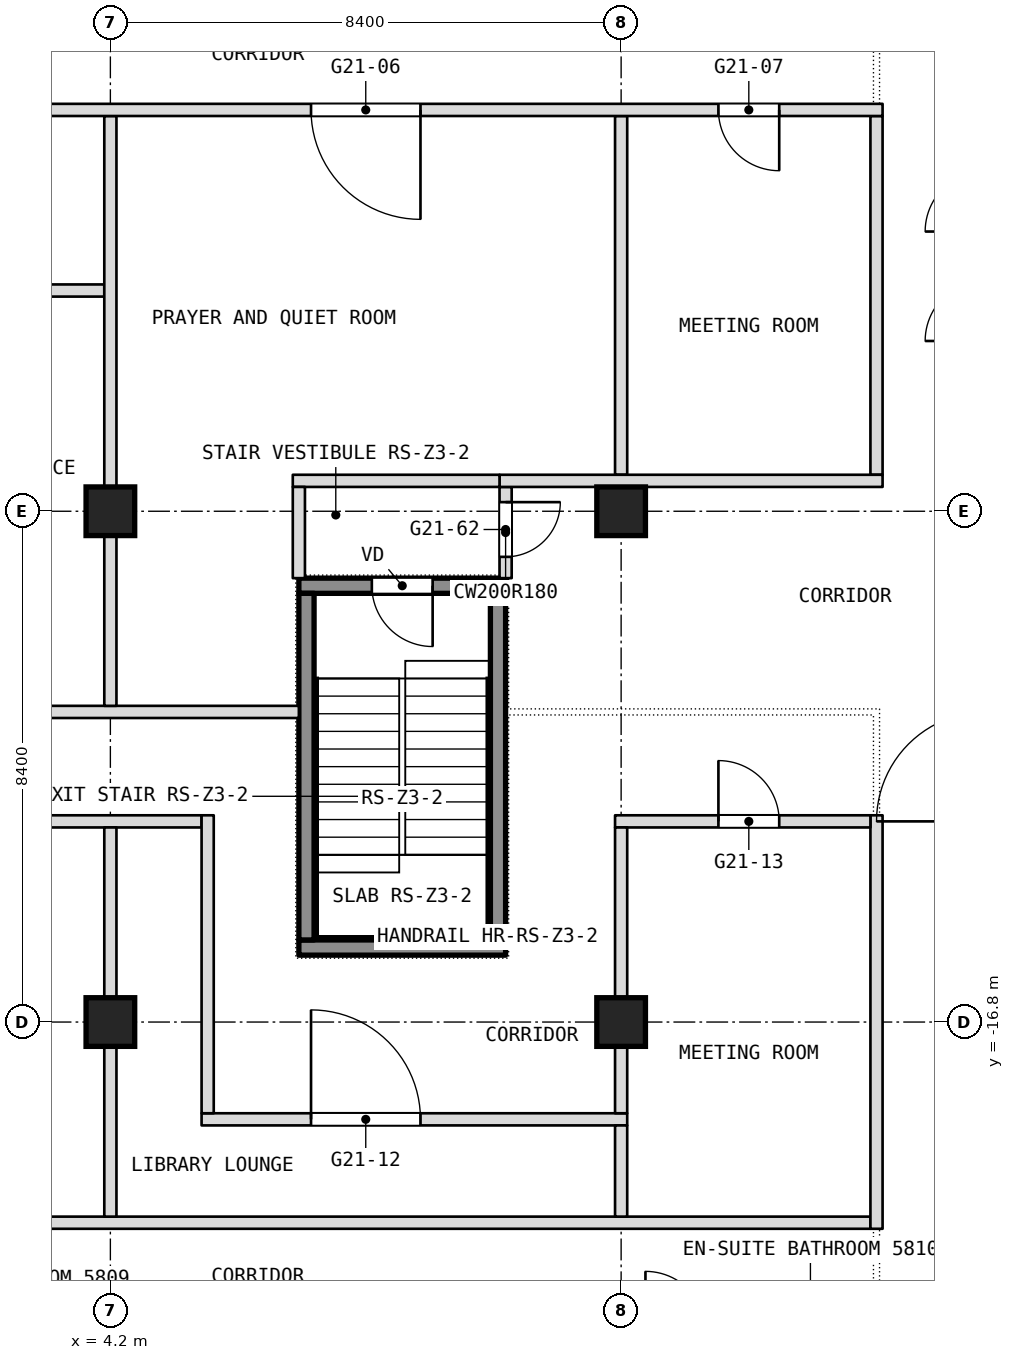
"""IFC4 building model, lengths in metres.
Left out: names, types, materials, properties, quantities, classifications, styles, units other than length and angle.
Written with IfcOpenShell. Run it as: python <this file> out.ifc"""

import sys

from ifc_helpers import new_model, si_unit, direction, frame, frame_2d, origin, origin_2d, place, context, subcontext, project, spatial, rectangle, extrude, element, fill, save


model = new_model("IFC4")
c1 = context("Model", 3, precision=1e-05, world=origin(), true_north=direction((0.0, 1.0)))
c2 = subcontext(c1, "Body", "Model", "MODEL_VIEW")
j1 = project(units=[si_unit("LENGTHUNIT", "METRE"), si_unit("PLANEANGLEUNIT", "RADIAN")], contexts=[c1])
p1 = place(None, origin())
s1 = spatial("IfcSite", under=j1, at=p1, CompositionType="ELEMENT")
p2 = place(p1, origin())
s2 = spatial("IfcBuilding", under=s1, at=p2, CompositionType="ELEMENT")
p3 = place(p2, frame((0.0, 0.0, 245.3)))
s3 = spatial("IfcBuildingStorey", under=s2, at=p3, CompositionType="ELEMENT", Elevation=245.3)
for number, where, z_axis, x_axis in (
    (1, (4.2, -16.8, 0.0), (0.0, 0.0, 1.0), (1.0, 0.0, 0.0)),
    (2, (4.2, -8.4, 0.0), (0.0, 0.0, 1.0), (1.0, 0.0, 0.0)),
    (3, (12.6, -16.8, 0.0), (0.0, 0.0, 1.0), (1.0, 0.0, 0.0)),
    (4, (12.6, -8.4, 0.0), (0.0, 0.0, 1.0), (1.0, 0.0, 0.0)),
):
    element("IfcColumn", number, at=place(p3, frame(where, z_axis=z_axis, x_axis=x_axis)), inside=s3, PredefinedType="COLUMN", context=c2, shape_type="SweptSolid", body=[
        extrude(rectangle(XDim=0.8, YDim=0.8, at=origin_2d()), origin(), (0.0, 0.0, 1.0), 3.6),
    ])
p4 = place(p3, frame((-16.7, -20.1, 0.0), z_axis=(0.0, 0.0, 1.0), x_axis=(1.0, 0.0, 0.0)))
e5 = element("IfcWall", 5, at=p4, inside=s3, PredefinedType="PARTITIONING", context=c2, shape_type="SweptSolid", body=[
    extrude(rectangle(XDim=33.4, YDim=0.2, at=frame_2d((16.7, 0.0))), origin(), (0.0, 0.0, 1.0), 3.34),
])
p5 = place(p3, frame((5.7, -18.4, 0.0), z_axis=(0.0, 0.0, 1.0), x_axis=(1.0, 0.0, 0.0)))
e6 = element("IfcWall", 6, at=p5, inside=s3, PredefinedType="PARTITIONING", context=c2, shape_type="SweptSolid", body=[
    extrude(rectangle(XDim=7.0, YDim=0.2, at=frame_2d((3.5, 0.0))), origin(), (0.0, 0.0, 1.0), 3.34),
])
p6 = place(p5, frame((1.8, 0.0, 0.0)))
e7 = element("IfcOpeningElement", 7, at=p6, cuts=e6, PredefinedType="OPENING", context=c2, shape_type="SweptSolid", body=[
    extrude(rectangle(XDim=1.8, YDim=2.1, at=frame_2d((0.9, 1.05))), frame((0.0, 0.1, 0.0), z_axis=(0.0, -1.0, 0.0), x_axis=(1.0, 0.0, 0.0)), (0.0, 0.0, 1.0), 0.2),
])
p7 = place(p3, frame((16.8, -20.2, 0.0), z_axis=(0.0, 0.0, 1.0), x_axis=(0.0, 1.0, 0.0)))
e8 = element("IfcWall", 8, at=p7, inside=s3, PredefinedType="PARTITIONING", context=c2, shape_type="SweptSolid", body=[
    extrude(rectangle(XDim=6.8, YDim=0.2, at=frame_2d((3.4, 0.0))), origin(), (0.0, 0.0, 1.0), 3.34),
])
p8 = place(p3, frame((16.8, -7.8, 0.0), z_axis=(0.0, 0.0, 1.0), x_axis=(0.0, 1.0, 0.0)))
e9 = element("IfcWall", 9, at=p8, inside=s3, PredefinedType="PARTITIONING", context=c2, shape_type="SweptSolid", body=[
    extrude(rectangle(XDim=5.9, YDim=0.2, at=frame_2d((2.95, 0.0))), origin(), (0.0, 0.0, 1.0), 3.34),
])
p9 = place(p3, frame((-5.9, -13.5, 0.0), z_axis=(0.0, 0.0, 1.0), x_axis=(1.0, 0.0, 0.0)))
e10 = element("IfcWall", 10, at=p9, inside=s3, PredefinedType="PARTITIONING", context=c2, shape_type="SweptSolid", body=[
    extrude(rectangle(XDim=11.6, YDim=0.2, at=frame_2d((5.8, 0.0))), origin(), (0.0, 0.0, 1.0), 3.34),
])
p10 = place(p9, frame((5.0, 0.0, 0.0)))
e11 = element("IfcOpeningElement", 11, at=p10, cuts=e10, PredefinedType="OPENING", context=c2, shape_type="SweptSolid", body=[
    extrude(rectangle(XDim=1.8, YDim=2.1, at=frame_2d((0.9, 1.05))), frame((0.0, 0.1, 0.0), z_axis=(0.0, -1.0, 0.0), x_axis=(1.0, 0.0, 0.0)), (0.0, 0.0, 1.0), 0.2),
])
p11 = place(p3, frame((12.5, -13.5, 0.0), z_axis=(0.0, 0.0, 1.0), x_axis=(1.0, 0.0, 0.0)))
e12 = element("IfcWall", 12, at=p11, inside=s3, PredefinedType="PARTITIONING", context=c2, shape_type="SweptSolid", body=[
    extrude(rectangle(XDim=4.2, YDim=0.2, at=frame_2d((2.1, 0.0))), origin(), (0.0, 0.0, 1.0), 3.34),
])
p12 = place(p11, frame((1.7, 0.0, 0.0)))
e13 = element("IfcOpeningElement", 13, at=p12, cuts=e12, PredefinedType="OPENING", context=c2, shape_type="SweptSolid", body=[
    extrude(rectangle(XDim=1.0, YDim=2.1, at=frame_2d((0.5, 1.05))), frame((0.0, 0.1, 0.0), z_axis=(0.0, -1.0, 0.0), x_axis=(1.0, 0.0, 0.0)), (0.0, 0.0, 1.0), 0.2),
])
p13 = place(p3, frame((12.6, -20.0, 0.0), z_axis=(0.0, 0.0, 1.0), x_axis=(0.0, 1.0, 0.0)))
e14 = element("IfcWall", 14, at=p13, inside=s3, PredefinedType="PARTITIONING", context=c2, shape_type="SweptSolid", body=[
    extrude(rectangle(XDim=1.5, YDim=0.2, at=frame_2d((0.75, 0.0))), origin(), (0.0, 0.0, 1.0), 3.34),
])
p14 = place(p3, frame((12.6, -7.8, 0.0), z_axis=(0.0, 0.0, 1.0), x_axis=(0.0, 1.0, 0.0)))
e15 = element("IfcWall", 15, at=p14, inside=s3, PredefinedType="PARTITIONING", context=c2, shape_type="SweptSolid", body=[
    extrude(rectangle(XDim=5.9, YDim=0.2, at=frame_2d((2.95, 0.0))), origin(), (0.0, 0.0, 1.0), 3.34),
])
p15 = place(p3, frame((12.6, -18.3, 0.0), z_axis=(0.0, 0.0, 1.0), x_axis=(0.0, 1.0, 0.0)))
e16 = element("IfcWall", 16, at=p15, inside=s3, PredefinedType="PARTITIONING", context=c2, shape_type="SweptSolid", body=[
    extrude(rectangle(XDim=4.7, YDim=0.2, at=frame_2d((2.35, 0.0))), origin(), (0.0, 0.0, 1.0), 3.34),
])
p16 = place(p3, frame((-7.3, -11.7, 0.0), z_axis=(0.0, 0.0, 1.0), x_axis=(1.0, 0.0, 0.0)))
e17 = element("IfcWall", 17, at=p16, inside=s3, PredefinedType="PARTITIONING", context=c2, shape_type="SweptSolid", body=[
    extrude(rectangle(XDim=14.6, YDim=0.2, at=frame_2d((7.3, 0.0))), origin(), (0.0, 0.0, 1.0), 3.34),
])
p17 = place(p16, frame((4.7, 0.0, 0.0)))
e18 = element("IfcOpeningElement", 18, at=p17, cuts=e17, PredefinedType="OPENING", context=c2, shape_type="SweptSolid", body=[
    extrude(rectangle(XDim=1.0, YDim=2.1, at=frame_2d((0.5, 1.05))), frame((0.0, 0.1, 0.0), z_axis=(0.0, -1.0, 0.0), x_axis=(1.0, 0.0, 0.0)), (0.0, 0.0, 1.0), 0.2),
])
p18 = place(p16, frame((8.9, 0.0, 0.0)))
e19 = element("IfcOpeningElement", 19, at=p18, cuts=e17, PredefinedType="OPENING", context=c2, shape_type="SweptSolid", body=[
    extrude(rectangle(XDim=1.0, YDim=2.1, at=frame_2d((0.5, 1.05))), frame((0.0, 0.1, 0.0), z_axis=(0.0, -1.0, 0.0), x_axis=(1.0, 0.0, 0.0)), (0.0, 0.0, 1.0), 0.2),
])
p19 = place(p3, frame((10.7, -9.5, 0.0), z_axis=(0.0, 0.0, 1.0), x_axis=(0.0, 1.0, 0.0)))
e20 = element("IfcWall", 20, at=p19, inside=s3, PredefinedType="PARTITIONING", context=c2, shape_type="SweptSolid", body=[
    extrude(rectangle(XDim=1.5, YDim=0.2, at=frame_2d((0.75, 0.0))), origin(), (0.0, 0.0, 1.0), 3.34),
])
p20 = place(p19, frame((0.35, 0.0, 0.0)))
e21 = element("IfcOpeningElement", 21, at=p20, cuts=e20, PredefinedType="OPENING", context=c2, shape_type="SweptSolid", body=[
    extrude(rectangle(XDim=0.9, YDim=2.1, at=frame_2d((0.45, 1.05))), frame((0.0, 0.1, 0.0), z_axis=(0.0, -1.0, 0.0), x_axis=(1.0, 0.0, 0.0)), (0.0, 0.0, 1.0), 0.2),
])
p21 = place(p3, frame((10.6, -7.9, 0.0), z_axis=(0.0, 0.0, 1.0), x_axis=(1.0, 0.0, 0.0)))
e22 = element("IfcWall", 22, at=p21, inside=s3, PredefinedType="PARTITIONING", context=c2, shape_type="SweptSolid", body=[
    extrude(rectangle(XDim=6.3, YDim=0.2, at=frame_2d((3.15, 0.0))), origin(), (0.0, 0.0, 1.0), 3.34),
])
p22 = place(p3, frame((7.2, -7.9, 0.0), z_axis=(0.0, 0.0, 1.0), x_axis=(1.0, 0.0, 0.0)))
e23 = element("IfcWall", 23, at=p22, inside=s3, PredefinedType="PARTITIONING", context=c2, shape_type="SweptSolid", body=[
    extrude(rectangle(XDim=3.4, YDim=0.2, at=frame_2d((1.7, 0.0))), origin(), (0.0, 0.0, 1.0), 3.34),
])
p23 = place(p3, frame((7.3, -9.5, 0.0), z_axis=(0.0, 0.0, 1.0), x_axis=(0.0, 1.0, 0.0)))
e24 = element("IfcWall", 24, at=p23, inside=s3, PredefinedType="PARTITIONING", context=c2, shape_type="SweptSolid", body=[
    extrude(rectangle(XDim=1.5, YDim=0.2, at=frame_2d((0.75, 0.0))), origin(), (0.0, 0.0, 1.0), 3.34),
])
p24 = place(p3, frame((5.8, -18.3, 0.0), z_axis=(0.0, 0.0, 1.0), x_axis=(0.0, 1.0, 0.0)))
e25 = element("IfcWall", 25, at=p24, inside=s3, PredefinedType="PARTITIONING", context=c2, shape_type="SweptSolid", body=[
    extrude(rectangle(XDim=4.9, YDim=0.2, at=frame_2d((2.45, 0.0))), origin(), (0.0, 0.0, 1.0), 3.34),
])
p25 = place(p3, frame((0.1, -4.77, 0.0), z_axis=(0.0, 0.0, 1.0), x_axis=(1.0, 0.0, 0.0)))
e26 = element("IfcWall", 26, at=p25, inside=s3, PredefinedType="PARTITIONING", context=c2, shape_type="SweptSolid", body=[
    extrude(rectangle(XDim=4.0, YDim=0.2, at=frame_2d((2.0, 0.0))), origin(), (0.0, 0.0, 1.0), 3.34),
])
p26 = place(p3, frame((4.2, -20.0, 0.0), z_axis=(0.0, 0.0, 1.0), x_axis=(0.0, 1.0, 0.0)))
e27 = element("IfcWall", 27, at=p26, inside=s3, PredefinedType="PARTITIONING", context=c2, shape_type="SweptSolid", body=[
    extrude(rectangle(XDim=6.4, YDim=0.2, at=frame_2d((3.2, 0.0))), origin(), (0.0, 0.0, 1.0), 3.34),
])
p27 = place(p3, frame((4.2, -11.6, 0.0), z_axis=(0.0, 0.0, 1.0), x_axis=(0.0, 1.0, 0.0)))
e28 = element("IfcWall", 28, at=p27, inside=s3, PredefinedType="PARTITIONING", context=c2, shape_type="SweptSolid", body=[
    extrude(rectangle(XDim=9.7, YDim=0.2, at=frame_2d((4.85, 0.0))), origin(), (0.0, 0.0, 1.0), 3.34),
])
p28 = place(p3, frame((-16.9, -1.8, 0.0), z_axis=(0.0, 0.0, 1.0), x_axis=(1.0, 0.0, 0.0)))
e29 = element("IfcWall", 29, at=p28, inside=s3, PredefinedType="PARTITIONING", context=c2, shape_type="SweptSolid", body=[
    extrude(rectangle(XDim=33.8, YDim=0.2, at=frame_2d((16.9, 0.0))), origin(), (0.0, 0.0, 1.0), 3.34),
])
p29 = place(p28, frame((1.7, 0.0, 0.0)))
e30 = element("IfcOpeningElement", 30, at=p29, cuts=e29, PredefinedType="OPENING", context=c2, shape_type="SweptSolid", body=[
    extrude(rectangle(XDim=1.0, YDim=2.1, at=frame_2d((0.5, 1.05))), frame((0.0, 0.1, 0.0), z_axis=(0.0, -1.0, 0.0), x_axis=(1.0, 0.0, 0.0)), (0.0, 0.0, 1.0), 0.2),
])
p30 = place(p28, frame((5.9, 0.0, 0.0)))
e31 = element("IfcOpeningElement", 31, at=p30, cuts=e29, PredefinedType="OPENING", context=c2, shape_type="SweptSolid", body=[
    extrude(rectangle(XDim=1.0, YDim=2.1, at=frame_2d((0.5, 1.05))), frame((0.0, 0.1, 0.0), z_axis=(0.0, -1.0, 0.0), x_axis=(1.0, 0.0, 0.0)), (0.0, 0.0, 1.0), 0.2),
])
p31 = place(p28, frame((10.1, 0.0, 0.0)))
e32 = element("IfcOpeningElement", 32, at=p31, cuts=e29, PredefinedType="OPENING", context=c2, shape_type="SweptSolid", body=[
    extrude(rectangle(XDim=1.0, YDim=2.1, at=frame_2d((0.5, 1.05))), frame((0.0, 0.1, 0.0), z_axis=(0.0, -1.0, 0.0), x_axis=(1.0, 0.0, 0.0)), (0.0, 0.0, 1.0), 0.2),
])
p32 = place(p28, frame((24.4, 0.0, 0.0)))
e33 = element("IfcOpeningElement", 33, at=p32, cuts=e29, PredefinedType="OPENING", context=c2, shape_type="SweptSolid", body=[
    extrude(rectangle(XDim=1.8, YDim=2.1, at=frame_2d((0.9, 1.05))), frame((0.0, 0.1, 0.0), z_axis=(0.0, -1.0, 0.0), x_axis=(1.0, 0.0, 0.0)), (0.0, 0.0, 1.0), 0.2),
])
p33 = place(p28, frame((31.1, 0.0, 0.0)))
e34 = element("IfcOpeningElement", 34, at=p33, cuts=e29, PredefinedType="OPENING", context=c2, shape_type="SweptSolid", body=[
    extrude(rectangle(XDim=1.0, YDim=2.1, at=frame_2d((0.5, 1.05))), frame((0.0, 0.1, 0.0), z_axis=(0.0, -1.0, 0.0), x_axis=(1.0, 0.0, 0.0)), (0.0, 0.0, 1.0), 0.2),
])
p34 = place(p28, frame((14.3, 0.0, 0.0)))
e35 = element("IfcOpeningElement", 35, at=p34, cuts=e29, PredefinedType="OPENING", context=c2, shape_type="SweptSolid", body=[
    extrude(rectangle(XDim=1.0, YDim=2.1, at=frame_2d((0.5, 1.05))), frame((0.0, 0.1, 0.0), z_axis=(0.0, -1.0, 0.0), x_axis=(1.0, 0.0, 0.0)), (0.0, 0.0, 1.0), 0.2),
])
p35 = place(p28, frame((18.5, 0.0, 0.0)))
e36 = element("IfcOpeningElement", 36, at=p35, cuts=e29, PredefinedType="OPENING", context=c2, shape_type="SweptSolid", body=[
    extrude(rectangle(XDim=1.0, YDim=2.1, at=frame_2d((0.5, 1.05))), frame((0.0, 0.1, 0.0), z_axis=(0.0, -1.0, 0.0), x_axis=(1.0, 0.0, 0.0)), (0.0, 0.0, 1.0), 0.2),
])
p36 = place(p3, frame((7.3, -15.575, 0.1), z_axis=(0.0, 0.0, 1.0), x_axis=(1.0, 0.0, 0.0)))
e37 = element("IfcWall", 37, at=p36, inside=s3, PredefinedType="SHEAR", context=c2, shape_type="SweptSolid", body=[
    extrude(rectangle(XDim=3.4, YDim=0.25, at=frame_2d((1.7, 0.0))), origin(), (0.0, 0.0, 1.0), 3.6),
])
p37 = place(p3, frame((7.3, -9.625, 0.1), z_axis=(0.0, 0.0, 1.0), x_axis=(1.0, 0.0, 0.0)))
e38 = element("IfcWall", 38, at=p37, inside=s3, PredefinedType="SHEAR", context=c2, shape_type="SweptSolid", body=[
    extrude(rectangle(XDim=3.4, YDim=0.25, at=frame_2d((1.7, 0.0))), origin(), (0.0, 0.0, 1.0), 3.6),
])
p38 = place(p37, frame((1.2, 0.0, 0.0)))
e39 = element("IfcOpeningElement", 39, at=p38, cuts=e38, PredefinedType="OPENING", context=c2, shape_type="SweptSolid", body=[
    extrude(rectangle(XDim=1.0, YDim=2.1, at=frame_2d((0.5, 1.05))), frame((0.0, 0.125, 0.0), z_axis=(0.0, -1.0, 0.0), x_axis=(1.0, 0.0, 0.0)), (0.0, 0.0, 1.0), 0.25),
])
for number, where, z_axis, x_axis in (
    (40, (7.425, -15.45, 0.1), (0.0, 0.0, 1.0), (0.0, 1.0, 0.0)),
    (41, (10.575, -15.45, 0.1), (0.0, 0.0, 1.0), (0.0, 1.0, 0.0)),
):
    element("IfcWall", number, at=place(p3, frame(where, z_axis=z_axis, x_axis=x_axis)), inside=s3, PredefinedType="SHEAR", context=c2, shape_type="SweptSolid", body=[
        extrude(rectangle(XDim=5.7, YDim=0.25, at=frame_2d((2.85, 0.0))), origin(), (0.0, 0.0, 1.0), 3.6),
    ])
p39 = place(p6, origin())
e42 = element("IfcDoor", 42, at=p39, inside=s3, OperationType="DOUBLE_DOOR_SINGLE_SWING", PredefinedType="DOOR", context=c2, shape_type="SweptSolid", body=[
    extrude(rectangle(XDim=1.8, YDim=2.1, at=frame_2d((0.9, 1.05))), frame((0.0, 0.025, 0.0), z_axis=(0.0, -1.0, 0.0), x_axis=(1.0, 0.0, 0.0)), (0.0, 0.0, 1.0), 0.05),
])
fill(e7, e42)
p40 = place(p12, origin())
e43 = element("IfcDoor", 43, at=p40, inside=s3, OperationType="SINGLE_SWING_LEFT", PredefinedType="DOOR", context=c2, shape_type="SweptSolid", body=[
    extrude(rectangle(XDim=1.0, YDim=2.1, at=frame_2d((0.5, 1.05))), frame((0.0, 0.025, 0.0), z_axis=(0.0, -1.0, 0.0), x_axis=(1.0, 0.0, 0.0)), (0.0, 0.0, 1.0), 0.05),
])
fill(e13, e43)
p41 = place(p20, origin())
e44 = element("IfcDoor", 44, at=p41, inside=s3, OperationType="SINGLE_SWING_RIGHT", PredefinedType="DOOR", context=c2, shape_type="SweptSolid", body=[
    extrude(rectangle(XDim=0.9, YDim=2.1, at=frame_2d((0.45, 1.05))), frame((0.0, 0.025, 0.0), z_axis=(0.0, -1.0, 0.0), x_axis=(1.0, 0.0, 0.0)), (0.0, 0.0, 1.0), 0.05),
])
fill(e21, e44)
p42 = place(p32, origin())
e45 = element("IfcDoor", 45, at=p42, inside=s3, OperationType="DOUBLE_DOOR_SINGLE_SWING", PredefinedType="DOOR", context=c2, shape_type="SweptSolid", body=[
    extrude(rectangle(XDim=1.8, YDim=2.1, at=frame_2d((0.9, 1.05))), frame((0.0, 0.025, 0.0), z_axis=(0.0, -1.0, 0.0), x_axis=(1.0, 0.0, 0.0)), (0.0, 0.0, 1.0), 0.05),
])
fill(e33, e45)
p43 = place(p33, origin())
e46 = element("IfcDoor", 46, at=p43, inside=s3, OperationType="SINGLE_SWING_RIGHT", PredefinedType="DOOR", context=c2, shape_type="SweptSolid", body=[
    extrude(rectangle(XDim=1.0, YDim=2.1, at=frame_2d((0.5, 1.05))), frame((0.0, 0.025, 0.0), z_axis=(0.0, -1.0, 0.0), x_axis=(1.0, 0.0, 0.0)), (0.0, 0.0, 1.0), 0.05),
])
fill(e34, e46)
p44 = place(p38, origin())
e47 = element("IfcDoor", 47, at=p44, inside=s3, OperationType="SINGLE_SWING_LEFT", PredefinedType="DOOR", context=c2, shape_type="SweptSolid", body=[
    extrude(rectangle(XDim=1.0, YDim=2.1, at=frame_2d((0.5, 1.05))), frame((0.0, 0.025, 0.0), z_axis=(0.0, -1.0, 0.0), x_axis=(1.0, 0.0, 0.0)), (0.0, 0.0, 1.0), 0.05),
])
fill(e39, e47)
save(model, sys.argv[1])
